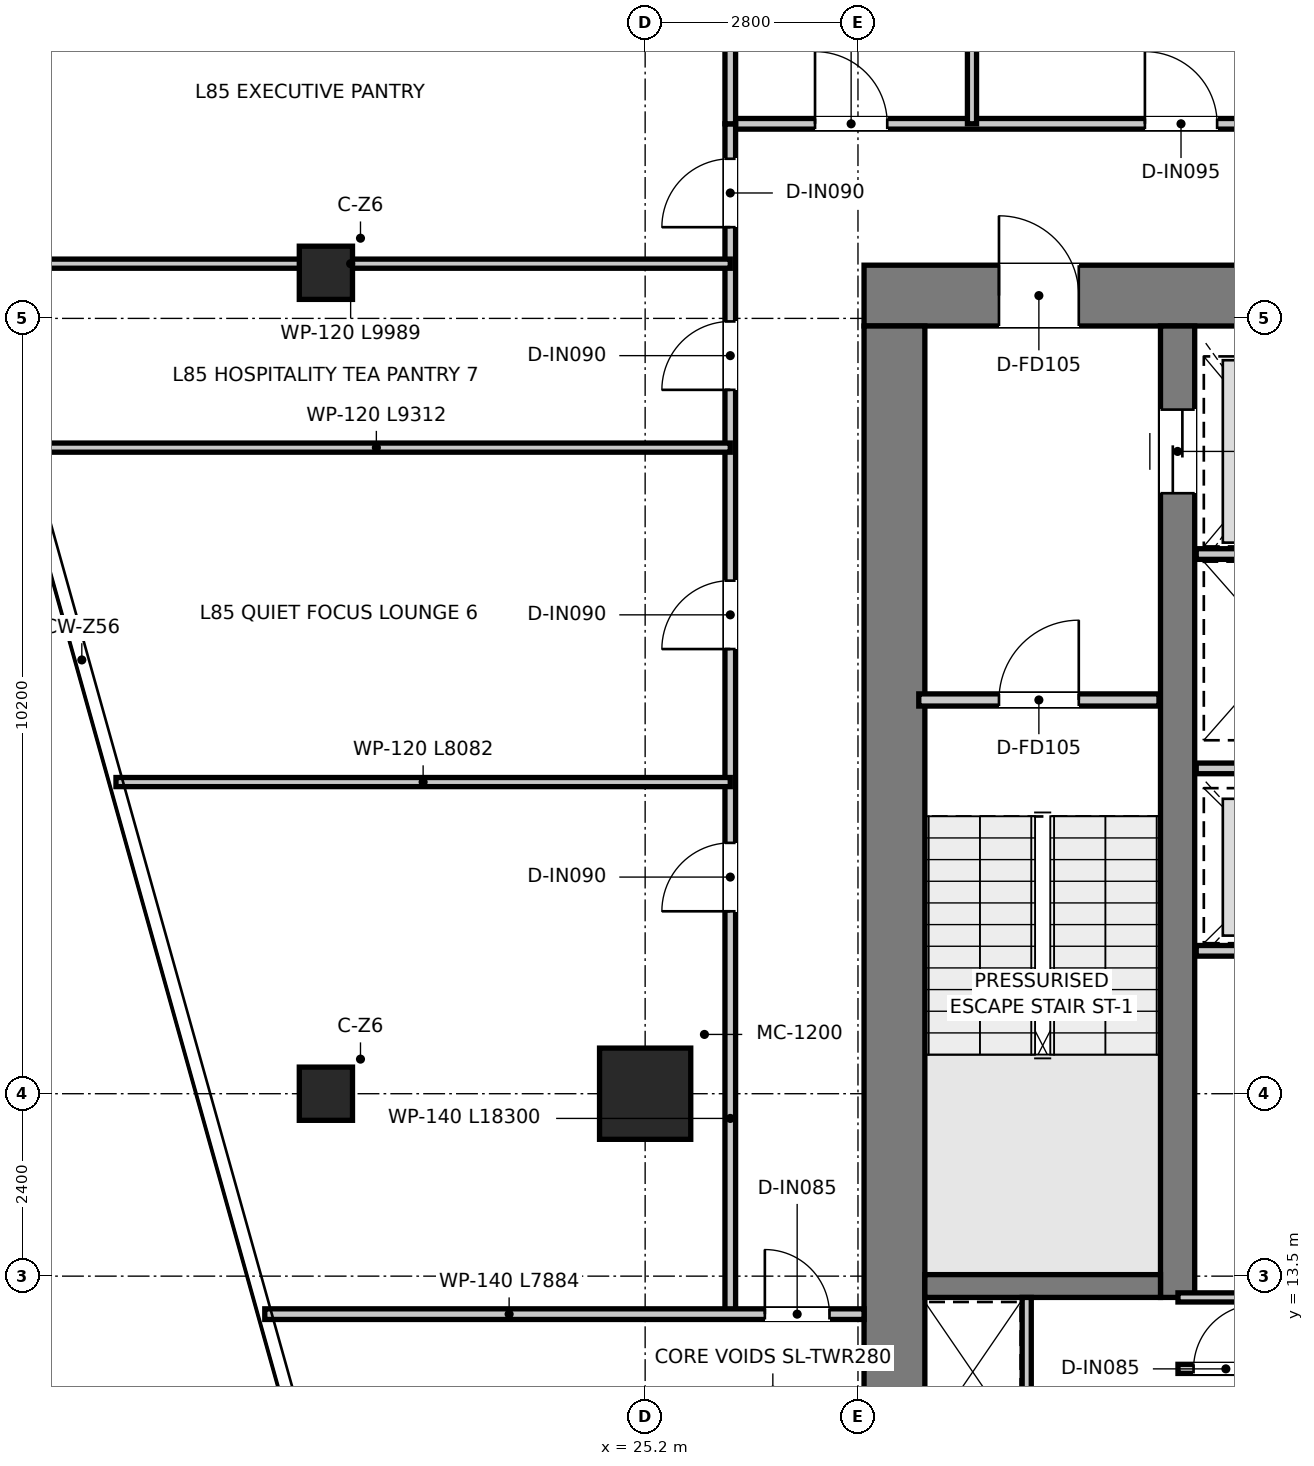
"""IFC4 building model, lengths in metres.
Left out: names, types, materials, properties, quantities, classifications, styles, units other than length and angle.
Written with IfcOpenShell. Run it as: python <this file> out.ifc"""

import sys

from ifc_helpers import new_model, si_unit, direction, frame, frame_2d, origin, origin_2d, place, context, subcontext, project, spatial, rectangle, extrude, source, transform, mapped, element, fill, save


model = new_model("IFC4")
c1 = context("Model", 3, precision=1e-05, world=origin(), true_north=direction((0.0, 1.0)))
c2 = subcontext(c1, "Body", "Model", "MODEL_VIEW")
j1 = project(units=[si_unit("LENGTHUNIT", "METRE"), si_unit("PLANEANGLEUNIT", "RADIAN")], contexts=[c1])
p1 = place(None, origin())
s1 = spatial("IfcSite", under=j1, at=p1, CompositionType="ELEMENT")
p2 = place(p1, origin())
s2 = spatial("IfcBuilding", under=s1, at=p2, CompositionType="ELEMENT")
p3 = place(p2, frame((0.0, 0.0, 347.45)))
s3 = spatial("IfcBuildingStorey", under=s2, at=p3, CompositionType="ELEMENT", Elevation=347.45)
p4 = place(p3, frame((28.08, 26.4, 0.0), z_axis=(0.0, 0.0, 1.0), x_axis=(1.0, 0.0, 0.0)))
e1 = element("IfcWall", 1, at=p4, inside=s3, PredefinedType="SHEAR", context=c2, shape_type="SweptSolid", body=[
    extrude(rectangle(XDim=15.84, YDim=0.8, at=frame_2d((7.92, 0.0))), origin(), (0.0, 0.0, 1.0), 3.95),
])
p5 = place(p4, frame((7.22, 0.0, 0.0)))
e2 = element("IfcOpeningElement", 2, at=p5, cuts=e1, PredefinedType="OPENING", context=c2, shape_type="SweptSolid", body=[
    extrude(rectangle(XDim=1.4, YDim=2.2, at=frame_2d((0.7, 1.1))), frame((0.0, 0.41, 0.0), z_axis=(0.0, -1.0, 0.0), x_axis=(1.0, 0.0, 0.0)), (0.0, 0.0, 1.0), 0.82),
])
p6 = place(p4, frame((1.775, 0.0, 0.0)))
e3 = element("IfcOpeningElement", 3, at=p6, cuts=e1, PredefinedType="OPENING", context=c2, shape_type="SweptSolid", body=[
    extrude(rectangle(XDim=1.05, YDim=2.1, at=frame_2d((0.525, 1.05))), frame((0.0, 0.41, 0.0), z_axis=(0.0, -1.0, 0.0), x_axis=(1.0, 0.0, 0.0)), (0.0, 0.0, 1.0), 0.82),
])
p7 = place(p4, frame((13.015, 0.0, 0.0)))
e4 = element("IfcOpeningElement", 4, at=p7, cuts=e1, PredefinedType="OPENING", context=c2, shape_type="SweptSolid", body=[
    extrude(rectangle(XDim=1.05, YDim=2.1, at=frame_2d((0.525, 1.05))), frame((0.0, 0.41, 0.0), z_axis=(0.0, -1.0, 0.0), x_axis=(1.0, 0.0, 0.0)), (0.0, 0.0, 1.0), 0.82),
])
p8 = place(p3, frame((28.48, 11.3, 0.0), z_axis=(0.0, 0.0, 1.0), x_axis=(0.0, 1.0, 0.0)))
e5 = element("IfcWall", 5, at=p8, inside=s3, PredefinedType="SHEAR", context=c2, shape_type="SweptSolid", body=[
    extrude(rectangle(XDim=14.7, YDim=0.8, at=frame_2d((7.35, 0.0))), origin(), (0.0, 0.0, 1.0), 3.95),
])
p9 = place(p3, frame((32.205, 13.22, 0.0), z_axis=(0.0, 0.0, 1.0), x_axis=(0.0, 1.0, 0.0)))
e6 = element("IfcWall", 6, at=p9, inside=s3, PredefinedType="SHEAR", context=c2, shape_type="SweptSolid", body=[
    extrude(rectangle(XDim=12.78, YDim=0.45, at=frame_2d((6.39, 0.0))), origin(), (0.0, 0.0, 1.0), 3.95),
])
p10 = place(p9, frame((10.58, 0.0, 0.0)))
e7 = element("IfcOpeningElement", 7, at=p10, cuts=e6, PredefinedType="OPENING", context=c2, shape_type="SweptSolid", body=[
    extrude(rectangle(XDim=1.1, YDim=2.15, at=frame_2d((0.55, 1.075))), frame((0.0, 0.235, 0.0), z_axis=(0.0, -1.0, 0.0), x_axis=(1.0, 0.0, 0.0)), (0.0, 0.0, 1.0), 0.47),
])
p11 = place(p3, frame((28.88, 13.37, 0.0), z_axis=(0.0, 0.0, 1.0), x_axis=(1.0, 0.0, 0.0)))
e8 = element("IfcWall", 8, at=p11, inside=s3, PredefinedType="SHEAR", context=c2, shape_type="SweptSolid", body=[
    extrude(rectangle(XDim=3.1, YDim=0.3, at=frame_2d((1.55, 0.0))), origin(), (0.0, 0.0, 1.0), 3.95),
])
m1 = source(origin(), c2, "Body", "SweptSolid", [
    extrude(rectangle(XDim=1.2, YDim=1.2, at=origin_2d()), origin(), (0.0, 0.0, 1.0), 3.95),
])
p12 = place(p3, frame((25.2, 15.9, 0.0), z_axis=(0.0, 0.0, 1.0), x_axis=(1.0, 0.0, 0.0)))
e9 = element("IfcColumn", 9, at=p12, inside=s3, PredefinedType="USERDEFINED", context=c2, shape_type="MappedRepresentation", body=[
    mapped(m1, transform((0.0, 0.0, 0.0), x_axis=(1.0, 0.0, 0.0), y_axis=(0.0, 1.0, 0.0), z_axis=(0.0, 0.0, 1.0), scale=1.0)),
])
m2 = source(origin(), c2, "Body", "SweptSolid", [
    extrude(rectangle(XDim=0.7, YDim=0.7, at=origin_2d()), origin(), (0.0, 0.0, 1.0), 3.95),
])
for number, where, z_axis, x_axis in (
    (10, (21.0, 15.9, 0.0), (0.0, 0.0, 1.0), (1.0, 0.0, 0.0)),
    (11, (21.0, 26.7, 0.0), (0.0, 0.0, 1.0), (1.0, 0.0, 0.0)),
):
    element("IfcColumn", number, at=place(p3, frame(where, z_axis=z_axis, x_axis=x_axis)), inside=s3, PredefinedType="COLUMN", context=c2, shape_type="MappedRepresentation", body=[
        mapped(m2, transform((0.0, 0.0, 0.0), x_axis=(1.0, 0.0, 0.0), y_axis=(0.0, 1.0, 0.0), z_axis=(0.0, 0.0, 1.0), scale=1.0)),
    ])
p13 = place(p3, frame((28.8, 21.08, 0.0), z_axis=(0.0, 0.0, 1.0), x_axis=(1.0, 0.0, 0.0)))
e12 = element("IfcWall", 12, at=p13, inside=s3, PredefinedType="PARTITIONING", context=c2, shape_type="SweptSolid", body=[
    extrude(rectangle(XDim=3.16, YDim=0.16, at=frame_2d((1.58, 0.0))), origin(), (0.0, 0.0, 1.0), 3.67),
])
p14 = place(p13, frame((1.055, 0.0, 0.0)))
e13 = element("IfcOpeningElement", 13, at=p14, cuts=e12, PredefinedType="OPENING", context=c2, shape_type="SweptSolid", body=[
    extrude(rectangle(XDim=1.05, YDim=2.1, at=frame_2d((0.525, 1.05))), frame((0.0, 0.09, 0.0), z_axis=(0.0, -1.0, 0.0), x_axis=(1.0, 0.0, 0.0)), (0.0, 0.0, 1.0), 0.18),
])
p15 = place(p3, frame((32.45, 23.0, 0.0), z_axis=(0.0, 0.0, 1.0), x_axis=(1.0, 0.0, 0.0)))
e14 = element("IfcWall", 14, at=p15, inside=s3, PredefinedType="PARTITIONING", context=c2, shape_type="SweptSolid", body=[
    extrude(rectangle(XDim=2.27, YDim=0.14, at=frame_2d((1.135, 0.0))), origin(), (0.0, 0.0, 1.0), 2.82),
])
for number, where, z_axis, x_axis in (
    (15, (32.45, 17.78, 0.0), (0.0, 0.0, 1.0), (1.0, 0.0, 0.0)),
    (16, (32.45, 20.18, 0.0), (0.0, 0.0, 1.0), (1.0, 0.0, 0.0)),
):
    element("IfcWall", number, at=place(p3, frame(where, z_axis=z_axis, x_axis=x_axis)), inside=s3, PredefinedType="PARTITIONING", context=c2, shape_type="SweptSolid", body=[
        extrude(rectangle(XDim=2.27, YDim=0.14, at=frame_2d((1.135, 0.0))), origin(), (0.0, 0.0, 1.0), 3.67),
    ])
p16 = place(p3, frame((30.22, 11.25, 0.0), z_axis=(0.0, 0.0, 1.0), x_axis=(0.0, 1.0, 0.0)))
e17 = element("IfcWall", 17, at=p16, inside=s3, PredefinedType="PARTITIONING", context=c2, shape_type="SweptSolid", body=[
    extrude(rectangle(XDim=1.97, YDim=0.12, at=frame_2d((0.985, 0.0))), origin(), (0.0, 0.0, 1.0), 3.67),
])
p17 = place(p3, frame((32.21, 13.22, 0.0), z_axis=(0.0, 0.0, 1.0), x_axis=(1.0, 0.0, 0.0)))
e18 = element("IfcWall", 18, at=p17, inside=s3, PredefinedType="PARTITIONING", context=c2, shape_type="SweptSolid", body=[
    extrude(rectangle(XDim=7.58, YDim=0.12, at=frame_2d((3.79, 0.0))), origin(), (0.0, 0.0, 1.0), 3.67),
])
p18 = place(p17, frame((3.365, 0.0, 0.0)))
e19 = element("IfcOpeningElement", 19, at=p18, cuts=e18, PredefinedType="OPENING", context=c2, shape_type="SweptSolid", body=[
    extrude(rectangle(XDim=0.85, YDim=2.1, at=frame_2d((0.425, 1.05))), frame((0.0, 0.07, 0.0), z_axis=(0.0, -1.0, 0.0), x_axis=(1.0, 0.0, 0.0)), (0.0, 0.0, 1.0), 0.14),
])
p19 = place(p3, frame((32.21, 12.28, 0.0), z_axis=(0.0, 0.0, 1.0), x_axis=(1.0, 0.0, 0.0)))
e20 = element("IfcWall", 20, at=p19, inside=s3, PredefinedType="PARTITIONING", context=c2, shape_type="SweptSolid", body=[
    extrude(rectangle(XDim=7.58, YDim=0.12, at=frame_2d((3.79, 0.0))), origin(), (0.0, 0.0, 1.0), 3.67),
])
p20 = place(p19, frame((0.205, 0.0, 0.0)))
e21 = element("IfcOpeningElement", 21, at=p20, cuts=e20, PredefinedType="OPENING", context=c2, shape_type="SweptSolid", body=[
    extrude(rectangle(XDim=0.85, YDim=2.1, at=frame_2d((0.425, 1.05))), frame((0.0, 0.07, 0.0), z_axis=(0.0, -1.0, 0.0), x_axis=(1.0, 0.0, 0.0)), (0.0, 0.0, 1.0), 0.14),
])
p21 = place(p19, frame((2.095, 0.0, 0.0)))
e22 = element("IfcOpeningElement", 22, at=p21, cuts=e20, PredefinedType="OPENING", context=c2, shape_type="SweptSolid", body=[
    extrude(rectangle(XDim=0.85, YDim=2.1, at=frame_2d((0.425, 1.05))), frame((0.0, 0.07, 0.0), z_axis=(0.0, -1.0, 0.0), x_axis=(1.0, 0.0, 0.0)), (0.0, 0.0, 1.0), 0.14),
])
p22 = place(p19, frame((4.635, 0.0, 0.0)))
e23 = element("IfcOpeningElement", 23, at=p22, cuts=e20, PredefinedType="OPENING", context=c2, shape_type="SweptSolid", body=[
    extrude(rectangle(XDim=0.85, YDim=2.1, at=frame_2d((0.425, 1.05))), frame((0.0, 0.07, 0.0), z_axis=(0.0, -1.0, 0.0), x_axis=(1.0, 0.0, 0.0)), (0.0, 0.0, 1.0), 0.14),
])
p23 = place(p19, frame((6.525, 0.0, 0.0)))
e24 = element("IfcOpeningElement", 24, at=p23, cuts=e20, PredefinedType="OPENING", context=c2, shape_type="SweptSolid", body=[
    extrude(rectangle(XDim=0.85, YDim=2.1, at=frame_2d((0.425, 1.05))), frame((0.0, 0.07, 0.0), z_axis=(0.0, -1.0, 0.0), x_axis=(1.0, 0.0, 0.0)), (0.0, 0.0, 1.0), 0.14),
])
p24 = place(p3, frame((26.32, 28.66, 0.0), z_axis=(0.0, 0.0, 1.0), x_axis=(1.0, 0.0, 0.0)))
e25 = element("IfcWall", 25, at=p24, inside=s3, PredefinedType="PARTITIONING", context=c2, shape_type="SweptSolid", body=[
    extrude(rectangle(XDim=19.36, YDim=0.14, at=frame_2d((9.68, 0.0))), origin(), (0.0, 0.0, 1.0), 3.18),
])
p25 = place(p24, frame((1.115, 0.0, 0.0)))
e26 = element("IfcOpeningElement", 26, at=p25, cuts=e25, PredefinedType="OPENING", context=c2, shape_type="SweptSolid", body=[
    extrude(rectangle(XDim=0.95, YDim=2.1, at=frame_2d((0.475, 1.05))), frame((0.0, 0.08, 0.0), z_axis=(0.0, -1.0, 0.0), x_axis=(1.0, 0.0, 0.0)), (0.0, 0.0, 1.0), 0.16),
])
p26 = place(p24, frame((5.455, 0.0, 0.0)))
e27 = element("IfcOpeningElement", 27, at=p26, cuts=e25, PredefinedType="OPENING", context=c2, shape_type="SweptSolid", body=[
    extrude(rectangle(XDim=0.95, YDim=2.1, at=frame_2d((0.475, 1.05))), frame((0.0, 0.08, 0.0), z_axis=(0.0, -1.0, 0.0), x_axis=(1.0, 0.0, 0.0)), (0.0, 0.0, 1.0), 0.16),
])
p27 = place(p24, frame((11.205, 0.0, 0.0)))
e28 = element("IfcOpeningElement", 28, at=p27, cuts=e25, PredefinedType="OPENING", context=c2, shape_type="SweptSolid", body=[
    extrude(rectangle(XDim=0.95, YDim=2.1, at=frame_2d((0.475, 1.05))), frame((0.0, 0.08, 0.0), z_axis=(0.0, -1.0, 0.0), x_axis=(1.0, 0.0, 0.0)), (0.0, 0.0, 1.0), 0.16),
])
p28 = place(p24, frame((16.545, 0.0, 0.0)))
e29 = element("IfcOpeningElement", 29, at=p28, cuts=e25, PredefinedType="OPENING", context=c2, shape_type="SweptSolid", body=[
    extrude(rectangle(XDim=0.95, YDim=2.1, at=frame_2d((0.475, 1.05))), frame((0.0, 0.08, 0.0), z_axis=(0.0, -1.0, 0.0), x_axis=(1.0, 0.0, 0.0)), (0.0, 0.0, 1.0), 0.16),
])
p29 = place(p3, frame((26.32, 13.0, 0.0), z_axis=(0.0, 0.0, 1.0), x_axis=(0.0, 1.0, 0.0)))
e30 = element("IfcWall", 30, at=p29, inside=s3, PredefinedType="PARTITIONING", context=c2, shape_type="SweptSolid", body=[
    extrude(rectangle(XDim=15.66, YDim=0.14, at=frame_2d((7.83, 0.0))), origin(), (0.0, 0.0, 1.0), 3.13),
])
p30 = place(p29, frame((14.3, 0.0, 0.0)))
e31 = element("IfcOpeningElement", 31, at=p30, cuts=e30, PredefinedType="OPENING", context=c2, shape_type="SweptSolid", body=[
    extrude(rectangle(XDim=0.9, YDim=2.1, at=frame_2d((0.45, 1.05))), frame((0.0, 0.08, 0.0), z_axis=(0.0, -1.0, 0.0), x_axis=(1.0, 0.0, 0.0)), (0.0, 0.0, 1.0), 0.16),
])
p31 = place(p29, frame((5.3, 0.0, 0.0)))
e32 = element("IfcOpeningElement", 32, at=p31, cuts=e30, PredefinedType="OPENING", context=c2, shape_type="SweptSolid", body=[
    extrude(rectangle(XDim=0.9, YDim=2.1, at=frame_2d((0.45, 1.05))), frame((0.0, 0.08, 0.0), z_axis=(0.0, -1.0, 0.0), x_axis=(1.0, 0.0, 0.0)), (0.0, 0.0, 1.0), 0.16),
])
p32 = place(p29, frame((8.75, 0.0, 0.0)))
e33 = element("IfcOpeningElement", 33, at=p32, cuts=e30, PredefinedType="OPENING", context=c2, shape_type="SweptSolid", body=[
    extrude(rectangle(XDim=0.9, YDim=2.1, at=frame_2d((0.45, 1.05))), frame((0.0, 0.08, 0.0), z_axis=(0.0, -1.0, 0.0), x_axis=(1.0, 0.0, 0.0)), (0.0, 0.0, 1.0), 0.16),
])
p33 = place(p29, frame((12.16, 0.0, 0.0)))
e34 = element("IfcOpeningElement", 34, at=p33, cuts=e30, PredefinedType="OPENING", context=c2, shape_type="SweptSolid", body=[
    extrude(rectangle(XDim=0.9, YDim=2.1, at=frame_2d((0.45, 1.05))), frame((0.0, 0.08, 0.0), z_axis=(0.0, -1.0, 0.0), x_axis=(1.0, 0.0, 0.0)), (0.0, 0.0, 1.0), 0.16),
])
p34 = place(p3, frame((20.196, 13.0, 0.0), z_axis=(0.0, 0.0, 1.0), x_axis=(1.0, 0.0, 0.0)))
e35 = element("IfcWall", 35, at=p34, inside=s3, PredefinedType="PARTITIONING", context=c2, shape_type="SweptSolid", body=[
    extrude(rectangle(XDim=7.884, YDim=0.14, at=frame_2d((3.942, 0.0))), origin(), (0.0, 0.0, 1.0), 3.18),
])
p35 = place(p34, frame((6.579, 0.0, 0.0)))
e36 = element("IfcOpeningElement", 36, at=p35, cuts=e35, PredefinedType="OPENING", context=c2, shape_type="SweptSolid", body=[
    extrude(rectangle(XDim=0.85, YDim=2.1, at=frame_2d((0.425, 1.05))), frame((0.0, 0.08, 0.0), z_axis=(0.0, -1.0, 0.0), x_axis=(1.0, 0.0, 0.0)), (0.0, 0.0, 1.0), 0.16),
])
p36 = place(p3, frame((16.331, 26.82, 0.0), z_axis=(0.0, 0.0, 1.0), x_axis=(1.0, 0.0, 0.0)))
e37 = element("IfcWall", 37, at=p36, inside=s3, PredefinedType="PARTITIONING", context=c2, shape_type="SweptSolid", body=[
    extrude(rectangle(XDim=9.989, YDim=0.12, at=frame_2d((4.995, 0.0))), origin(), (0.0, 0.0, 1.0), 3.13),
])
p37 = place(p3, frame((26.32, 28.66, 0.0), z_axis=(0.0, 0.0, 1.0), x_axis=(0.0, 1.0, 0.0)))
e38 = element("IfcWall", 38, at=p37, inside=s3, PredefinedType="PARTITIONING", context=c2, shape_type="SweptSolid", body=[
    extrude(rectangle(XDim=2.64, YDim=0.14, at=frame_2d((1.32, 0.0))), origin(), (0.0, 0.0, 1.0), 3.43),
])
p38 = place(p3, frame((29.5, 28.66, 0.0), z_axis=(0.0, 0.0, 1.0), x_axis=(0.0, 1.0, 0.0)))
e39 = element("IfcWall", 39, at=p38, inside=s3, PredefinedType="PARTITIONING", context=c2, shape_type="SweptSolid", body=[
    extrude(rectangle(XDim=15.858, YDim=0.12, at=frame_2d((7.929, 0.0))), origin(), (0.0, 0.0, 1.0), 3.13),
])
p39 = place(p3, frame((18.238, 20.0, 0.0), z_axis=(0.0, 0.0, 1.0), x_axis=(1.0, 0.0, 0.0)))
e40 = element("IfcWall", 40, at=p39, inside=s3, PredefinedType="PARTITIONING", context=c2, shape_type="SweptSolid", body=[
    extrude(rectangle(XDim=8.082, YDim=0.12, at=frame_2d((4.041, 0.0))), origin(), (0.0, 0.0, 1.0), 3.13),
])
p40 = place(p3, frame((17.008, 24.4, 0.0), z_axis=(0.0, 0.0, 1.0), x_axis=(1.0, 0.0, 0.0)))
e41 = element("IfcWall", 41, at=p40, inside=s3, PredefinedType="PARTITIONING", context=c2, shape_type="SweptSolid", body=[
    extrude(rectangle(XDim=9.312, YDim=0.12, at=frame_2d((4.656, 0.0))), origin(), (0.0, 0.0, 1.0), 3.13),
])
p41 = place(p14, origin())
e42 = element("IfcDoor", 42, at=p41, inside=s3, OperationType="SINGLE_SWING_RIGHT", PredefinedType="DOOR", context=c2, shape_type="SweptSolid", body=[
    extrude(rectangle(XDim=1.05, YDim=2.1, at=frame_2d((0.525, 1.05))), frame((0.0, 0.025, 0.0), z_axis=(0.0, -1.0, 0.0), x_axis=(1.0, 0.0, 0.0)), (0.0, 0.0, 1.0), 0.05),
])
fill(e13, e42)
p42 = place(p6, origin())
e43 = element("IfcDoor", 43, at=p42, inside=s3, OperationType="SINGLE_SWING_LEFT", PredefinedType="DOOR", context=c2, shape_type="SweptSolid", body=[
    extrude(rectangle(XDim=1.05, YDim=2.1, at=frame_2d((0.525, 1.05))), frame((0.0, 0.025, 0.0), z_axis=(0.0, -1.0, 0.0), x_axis=(1.0, 0.0, 0.0)), (0.0, 0.0, 1.0), 0.05),
])
fill(e3, e43)
p43 = place(p10, origin())
e44 = element("IfcDoor", 44, at=p43, inside=s3, OperationType="DOUBLE_DOOR_SLIDING", PredefinedType="DOOR", context=c2, shape_type="SweptSolid", body=[
    extrude(rectangle(XDim=1.1, YDim=2.15, at=frame_2d((0.55, 1.075))), frame((0.0, 0.025, 0.0), z_axis=(0.0, -1.0, 0.0), x_axis=(1.0, 0.0, 0.0)), (0.0, 0.0, 1.0), 0.05),
])
fill(e7, e44)
p44 = place(p20, origin())
e45 = element("IfcDoor", 45, at=p44, inside=s3, OperationType="SINGLE_SWING_RIGHT", PredefinedType="DOOR", context=c2, shape_type="SweptSolid", body=[
    extrude(rectangle(XDim=0.85, YDim=2.1, at=frame_2d((0.425, 1.05))), frame((0.0, 0.025, 0.0), z_axis=(0.0, -1.0, 0.0), x_axis=(1.0, 0.0, 0.0)), (0.0, 0.0, 1.0), 0.05),
])
fill(e21, e45)
p45 = place(p30, origin())
e46 = element("IfcDoor", 46, at=p45, inside=s3, OperationType="SINGLE_SWING_LEFT", PredefinedType="DOOR", context=c2, shape_type="SweptSolid", body=[
    extrude(rectangle(XDim=0.9, YDim=2.1, at=frame_2d((0.45, 1.05))), frame((0.0, 0.025, 0.0), z_axis=(0.0, -1.0, 0.0), x_axis=(1.0, 0.0, 0.0)), (0.0, 0.0, 1.0), 0.05),
])
fill(e31, e46)
p46 = place(p25, origin())
e47 = element("IfcDoor", 47, at=p46, inside=s3, OperationType="SINGLE_SWING_LEFT", PredefinedType="DOOR", context=c2, shape_type="SweptSolid", body=[
    extrude(rectangle(XDim=0.95, YDim=2.1, at=frame_2d((0.475, 1.05))), frame((0.0, 0.025, 0.0), z_axis=(0.0, -1.0, 0.0), x_axis=(1.0, 0.0, 0.0)), (0.0, 0.0, 1.0), 0.05),
])
fill(e26, e47)
p47 = place(p26, origin())
e48 = element("IfcDoor", 48, at=p47, inside=s3, OperationType="SINGLE_SWING_LEFT", PredefinedType="DOOR", context=c2, shape_type="SweptSolid", body=[
    extrude(rectangle(XDim=0.95, YDim=2.1, at=frame_2d((0.475, 1.05))), frame((0.0, 0.025, 0.0), z_axis=(0.0, -1.0, 0.0), x_axis=(1.0, 0.0, 0.0)), (0.0, 0.0, 1.0), 0.05),
])
fill(e27, e48)
p48 = place(p31, origin())
e49 = element("IfcDoor", 49, at=p48, inside=s3, OperationType="SINGLE_SWING_LEFT", PredefinedType="DOOR", context=c2, shape_type="SweptSolid", body=[
    extrude(rectangle(XDim=0.9, YDim=2.1, at=frame_2d((0.45, 1.05))), frame((0.0, 0.025, 0.0), z_axis=(0.0, -1.0, 0.0), x_axis=(1.0, 0.0, 0.0)), (0.0, 0.0, 1.0), 0.05),
])
fill(e32, e49)
p49 = place(p32, origin())
e50 = element("IfcDoor", 50, at=p49, inside=s3, OperationType="SINGLE_SWING_LEFT", PredefinedType="DOOR", context=c2, shape_type="SweptSolid", body=[
    extrude(rectangle(XDim=0.9, YDim=2.1, at=frame_2d((0.45, 1.05))), frame((0.0, 0.025, 0.0), z_axis=(0.0, -1.0, 0.0), x_axis=(1.0, 0.0, 0.0)), (0.0, 0.0, 1.0), 0.05),
])
fill(e33, e50)
p50 = place(p33, origin())
e51 = element("IfcDoor", 51, at=p50, inside=s3, OperationType="SINGLE_SWING_LEFT", PredefinedType="DOOR", context=c2, shape_type="SweptSolid", body=[
    extrude(rectangle(XDim=0.9, YDim=2.1, at=frame_2d((0.45, 1.05))), frame((0.0, 0.025, 0.0), z_axis=(0.0, -1.0, 0.0), x_axis=(1.0, 0.0, 0.0)), (0.0, 0.0, 1.0), 0.05),
])
fill(e34, e51)
p51 = place(p35, origin())
e52 = element("IfcDoor", 52, at=p51, inside=s3, OperationType="SINGLE_SWING_LEFT", PredefinedType="DOOR", context=c2, shape_type="SweptSolid", body=[
    extrude(rectangle(XDim=0.85, YDim=2.1, at=frame_2d((0.425, 1.05))), frame((0.0, 0.025, 0.0), z_axis=(0.0, -1.0, 0.0), x_axis=(1.0, 0.0, 0.0)), (0.0, 0.0, 1.0), 0.05),
])
fill(e36, e52)
save(model, sys.argv[1])
